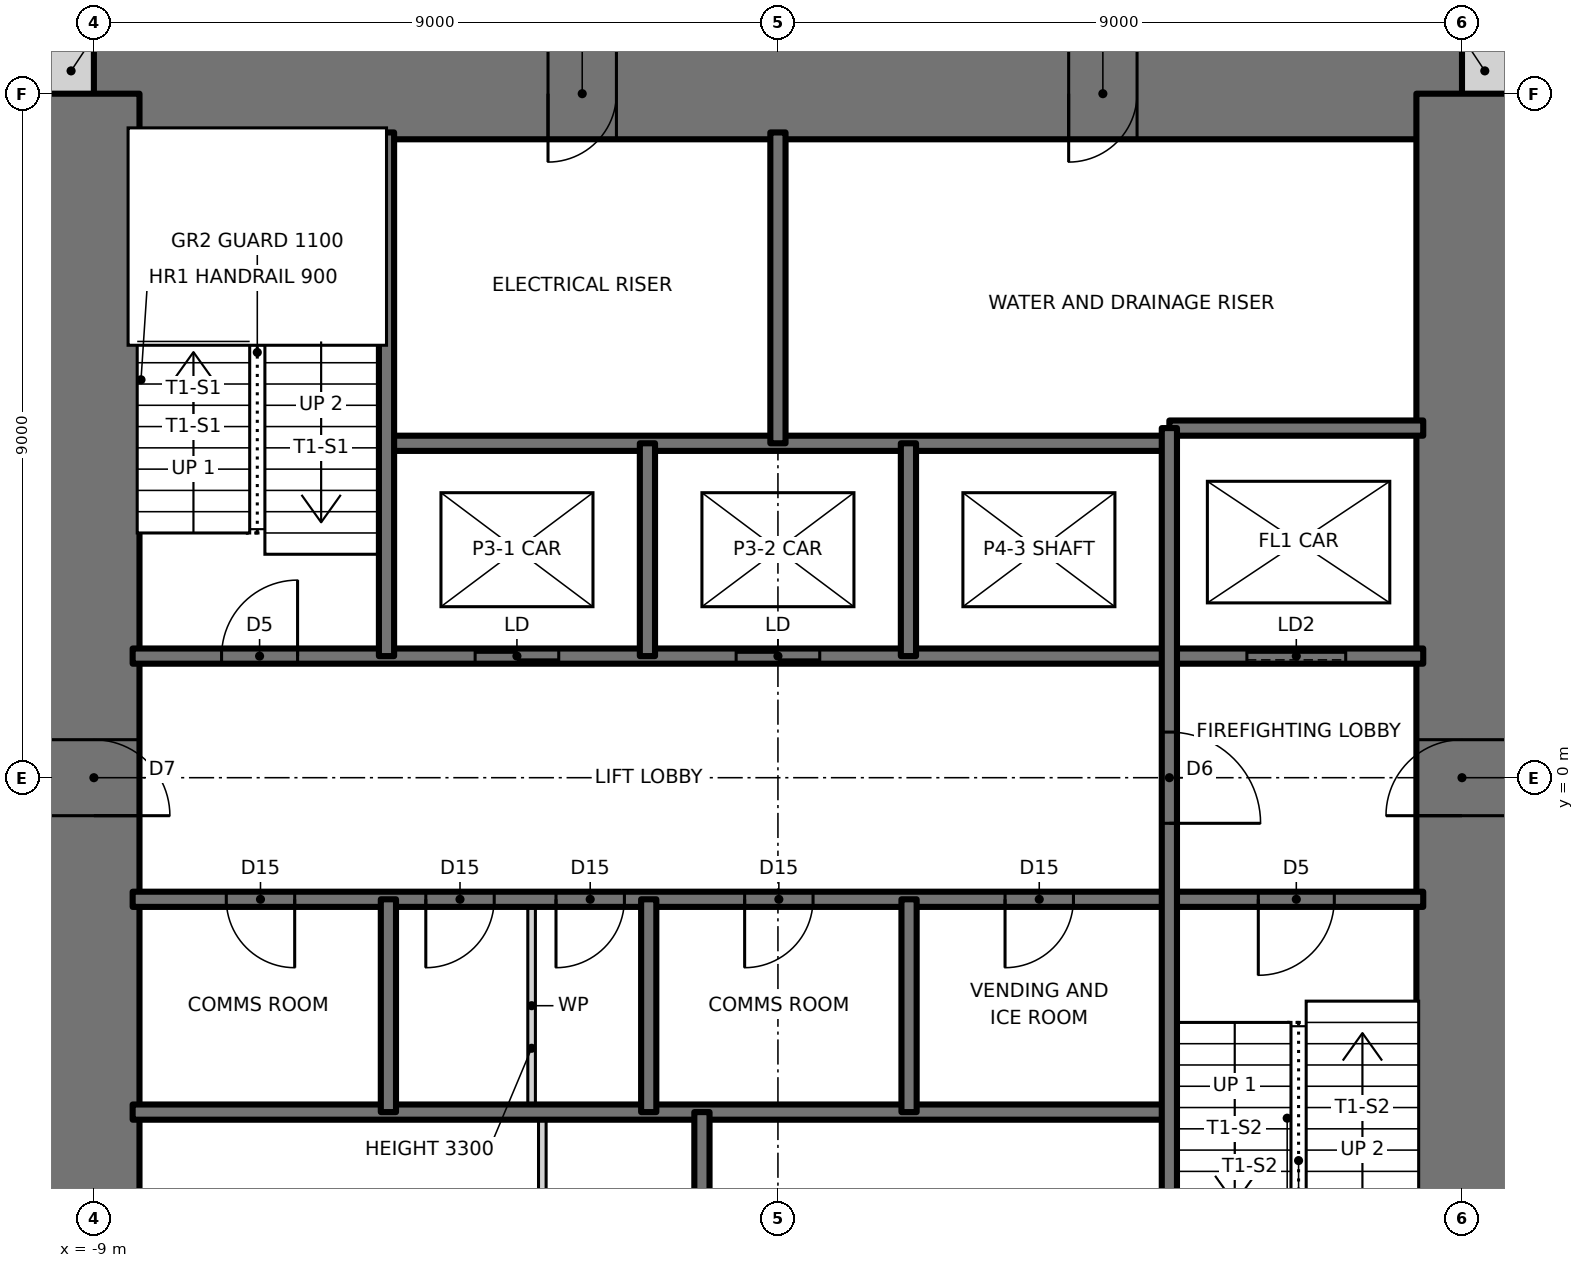
"""IFC4 building model, lengths in metres.
Left out: names, types, materials, properties, quantities, classifications, styles, units other than length and angle.
Written with IfcOpenShell. Run it as: python <this file> out.ifc"""

import sys

from ifc_helpers import new_model, si_unit, direction, frame, frame_2d, origin, place, context, subcontext, project, spatial, rectangle, extrude, element, fill, save


model = new_model("IFC4")
c1 = context("Model", 3, precision=1e-05, world=origin(), true_north=direction((0.0, 1.0)))
c2 = subcontext(c1, "Body", "Model", "MODEL_VIEW")
j1 = project(units=[si_unit("LENGTHUNIT", "METRE"), si_unit("PLANEANGLEUNIT", "RADIAN")], contexts=[c1])
p1 = place(None, origin())
s1 = spatial("IfcSite", under=j1, at=p1, CompositionType="ELEMENT")
p2 = place(p1, origin())
s2 = spatial("IfcBuilding", under=s1, at=p2, CompositionType="ELEMENT")
p3 = place(p2, frame((0.0, 0.0, 163.5)))
s3 = spatial("IfcBuildingStorey", under=s2, at=p3, CompositionType="ELEMENT", Elevation=163.5)
for number, where, z_axis, x_axis in (
    (1, (9.0, 9.3, 0.0), (0.0, 0.0, 1.0), (1.0, 0.0, 0.0)),
    (2, (-9.6, 9.3, 0.0), (0.0, 0.0, 1.0), (1.0, 0.0, 0.0)),
):
    element("IfcWall", number, at=place(p3, frame(where, z_axis=z_axis, x_axis=x_axis)), inside=s3, PredefinedType="SOLIDWALL", context=c2, shape_type="SweptSolid", body=[
        extrude(rectangle(XDim=0.6, YDim=0.6, at=frame_2d((0.3, 0.0))), origin(), (0.0, 0.0, 1.0), 3.5),
    ])
p4 = place(p3, frame((9.0, 9.0, 0.0), z_axis=(0.0, 0.0, 1.0), x_axis=(-1.0, 0.0, 0.0)))
e3 = element("IfcWall", 3, at=p4, inside=s3, PredefinedType="SHEAR", context=c2, shape_type="SweptSolid", body=[
    extrude(rectangle(XDim=18.0, YDim=1.2, at=frame_2d((9.0, 0.0))), origin(), (0.0, 0.0, 1.0), 3.5),
])
p5 = place(p4, frame((11.125, 0.0, 0.0)))
e4 = element("IfcOpeningElement", 4, at=p5, cuts=e3, PredefinedType="OPENING", context=c2, shape_type="SweptSolid", body=[
    extrude(rectangle(XDim=0.9, YDim=2.1, at=frame_2d((0.45, 1.05))), frame((0.0, 0.61, 0.0), z_axis=(0.0, -1.0, 0.0), x_axis=(1.0, 0.0, 0.0)), (0.0, 0.0, 1.0), 1.22),
])
p6 = place(p4, frame((4.275, 0.0, 0.0)))
e5 = element("IfcOpeningElement", 5, at=p6, cuts=e3, PredefinedType="OPENING", context=c2, shape_type="SweptSolid", body=[
    extrude(rectangle(XDim=0.9, YDim=2.1, at=frame_2d((0.45, 1.05))), frame((0.0, 0.61, 0.0), z_axis=(0.0, -1.0, 0.0), x_axis=(1.0, 0.0, 0.0)), (0.0, 0.0, 1.0), 1.22),
])
p7 = place(p3, frame((9.0, -9.0, 0.0), z_axis=(0.0, 0.0, 1.0), x_axis=(0.0, 1.0, 0.0)))
e6 = element("IfcWall", 6, at=p7, inside=s3, PredefinedType="SHEAR", context=c2, shape_type="SweptSolid", body=[
    extrude(rectangle(XDim=18.0, YDim=1.2, at=frame_2d((9.0, 0.0))), origin(), (0.0, 0.0, 1.0), 3.5),
])
p8 = place(p7, frame((8.5, 0.0, 0.0)))
e7 = element("IfcOpeningElement", 7, at=p8, cuts=e6, PredefinedType="OPENING", context=c2, shape_type="SweptSolid", body=[
    extrude(rectangle(XDim=1.0, YDim=2.1, at=frame_2d((0.5, 1.05))), frame((0.0, 0.61, 0.0), z_axis=(0.0, -1.0, 0.0), x_axis=(1.0, 0.0, 0.0)), (0.0, 0.0, 1.0), 1.22),
])
p9 = place(p3, frame((-9.0, 9.0, 0.0), z_axis=(0.0, 0.0, 1.0), x_axis=(0.0, -1.0, 0.0)))
e8 = element("IfcWall", 8, at=p9, inside=s3, PredefinedType="SHEAR", context=c2, shape_type="SweptSolid", body=[
    extrude(rectangle(XDim=18.0, YDim=1.2, at=frame_2d((9.0, 0.0))), origin(), (0.0, 0.0, 1.0), 3.5),
])
p10 = place(p9, frame((8.5, 0.0, 0.0)))
e9 = element("IfcOpeningElement", 9, at=p10, cuts=e8, PredefinedType="OPENING", context=c2, shape_type="SweptSolid", body=[
    extrude(rectangle(XDim=1.0, YDim=2.1, at=frame_2d((0.5, 1.05))), frame((0.0, 0.61, 0.0), z_axis=(0.0, -1.0, 0.0), x_axis=(1.0, 0.0, 0.0)), (0.0, 0.0, 1.0), 1.22),
])
p11 = place(p3, frame((-8.49, -4.4, 0.0), z_axis=(0.0, 0.0, 1.0), x_axis=(1.0, 0.0, 0.0)))
e10 = element("IfcWall", 10, at=p11, inside=s3, PredefinedType="SOLIDWALL", context=c2, shape_type="SweptSolid", body=[
    extrude(rectangle(XDim=13.64, YDim=0.2, at=frame_2d((6.82, 0.0))), origin(), (0.0, 0.0, 1.0), 3.5),
])
p12 = place(p3, frame((-8.49, -1.6, 0.0), z_axis=(0.0, 0.0, 1.0), x_axis=(1.0, 0.0, 0.0)))
e11 = element("IfcWall", 11, at=p12, inside=s3, PredefinedType="SOLIDWALL", context=c2, shape_type="SweptSolid", body=[
    extrude(rectangle(XDim=16.98, YDim=0.2, at=frame_2d((8.49, 0.0))), origin(), (0.0, 0.0, 1.0), 3.5),
])
p13 = place(p12, frame((14.81, 0.0, 0.0)))
e12 = element("IfcOpeningElement", 12, at=p13, cuts=e11, PredefinedType="OPENING", context=c2, shape_type="SweptSolid", body=[
    extrude(rectangle(XDim=1.0, YDim=2.1, at=frame_2d((0.5, 1.05))), frame((0.0, 0.11, 0.0), z_axis=(0.0, -1.0, 0.0), x_axis=(1.0, 0.0, 0.0)), (0.0, 0.0, 1.0), 0.22),
])
p14 = place(p12, frame((1.232, 0.0, 0.0)))
e13 = element("IfcOpeningElement", 13, at=p14, cuts=e11, PredefinedType="OPENING", context=c2, shape_type="SweptSolid", body=[
    extrude(rectangle(XDim=0.9, YDim=2.1, at=frame_2d((0.45, 1.05))), frame((0.0, 0.11, 0.0), z_axis=(0.0, -1.0, 0.0), x_axis=(1.0, 0.0, 0.0)), (0.0, 0.0, 1.0), 0.22),
])
p15 = place(p12, frame((5.57, 0.0, 0.0)))
e14 = element("IfcOpeningElement", 14, at=p15, cuts=e11, PredefinedType="OPENING", context=c2, shape_type="SweptSolid", body=[
    extrude(rectangle(XDim=0.9, YDim=2.1, at=frame_2d((0.45, 1.05))), frame((0.0, 0.11, 0.0), z_axis=(0.0, -1.0, 0.0), x_axis=(1.0, 0.0, 0.0)), (0.0, 0.0, 1.0), 0.22),
])
p16 = place(p12, frame((3.857, 0.0, 0.0)))
e15 = element("IfcOpeningElement", 15, at=p16, cuts=e11, PredefinedType="OPENING", context=c2, shape_type="SweptSolid", body=[
    extrude(rectangle(XDim=0.9, YDim=2.1, at=frame_2d((0.45, 1.05))), frame((0.0, 0.11, 0.0), z_axis=(0.0, -1.0, 0.0), x_axis=(1.0, 0.0, 0.0)), (0.0, 0.0, 1.0), 0.22),
])
p17 = place(p12, frame((8.052, 0.0, 0.0)))
e16 = element("IfcOpeningElement", 16, at=p17, cuts=e11, PredefinedType="OPENING", context=c2, shape_type="SweptSolid", body=[
    extrude(rectangle(XDim=0.9, YDim=2.1, at=frame_2d((0.45, 1.05))), frame((0.0, 0.11, 0.0), z_axis=(0.0, -1.0, 0.0), x_axis=(1.0, 0.0, 0.0)), (0.0, 0.0, 1.0), 0.22),
])
p18 = place(p12, frame((11.478, 0.0, 0.0)))
e17 = element("IfcOpeningElement", 17, at=p18, cuts=e11, PredefinedType="OPENING", context=c2, shape_type="SweptSolid", body=[
    extrude(rectangle(XDim=0.9, YDim=2.1, at=frame_2d((0.45, 1.05))), frame((0.0, 0.11, 0.0), z_axis=(0.0, -1.0, 0.0), x_axis=(1.0, 0.0, 0.0)), (0.0, 0.0, 1.0), 0.22),
])
p19 = place(p3, frame((-8.49, 1.6, 0.0), z_axis=(0.0, 0.0, 1.0), x_axis=(1.0, 0.0, 0.0)))
e18 = element("IfcWall", 18, at=p19, inside=s3, PredefinedType="SOLIDWALL", context=c2, shape_type="SweptSolid", body=[
    extrude(rectangle(XDim=16.98, YDim=0.2, at=frame_2d((8.49, 0.0))), origin(), (0.0, 0.0, 1.0), 3.5),
])
p20 = place(p19, frame((1.17, 0.0, 0.0)))
e19 = element("IfcOpeningElement", 19, at=p20, cuts=e18, PredefinedType="OPENING", context=c2, shape_type="SweptSolid", body=[
    extrude(rectangle(XDim=1.0, YDim=2.1, at=frame_2d((0.5, 1.05))), frame((0.0, 0.11, 0.0), z_axis=(0.0, -1.0, 0.0), x_axis=(1.0, 0.0, 0.0)), (0.0, 0.0, 1.0), 0.22),
])
p21 = place(p19, frame((4.506, 0.0, 0.0)))
e20 = element("IfcOpeningElement", 20, at=p21, cuts=e18, PredefinedType="OPENING", context=c2, shape_type="SweptSolid", body=[
    extrude(rectangle(XDim=1.1, YDim=2.1, at=frame_2d((0.55, 1.05))), frame((0.0, 0.11, 0.0), z_axis=(0.0, -1.0, 0.0), x_axis=(1.0, 0.0, 0.0)), (0.0, 0.0, 1.0), 0.22),
])
p22 = place(p19, frame((7.94, 0.0, 0.0)))
e21 = element("IfcOpeningElement", 21, at=p22, cuts=e18, PredefinedType="OPENING", context=c2, shape_type="SweptSolid", body=[
    extrude(rectangle(XDim=1.1, YDim=2.1, at=frame_2d((0.55, 1.05))), frame((0.0, 0.11, 0.0), z_axis=(0.0, -1.0, 0.0), x_axis=(1.0, 0.0, 0.0)), (0.0, 0.0, 1.0), 0.22),
])
p23 = place(p19, frame((14.66, 0.0, 0.0)))
e22 = element("IfcOpeningElement", 22, at=p23, cuts=e18, PredefinedType="OPENING", context=c2, shape_type="SweptSolid", body=[
    extrude(rectangle(XDim=1.3, YDim=2.1, at=frame_2d((0.65, 1.05))), frame((0.0, 0.11, 0.0), z_axis=(0.0, -1.0, 0.0), x_axis=(1.0, 0.0, 0.0)), (0.0, 0.0, 1.0), 0.22),
])
p24 = place(p3, frame((-5.15, 4.4, 0.0), z_axis=(0.0, 0.0, 1.0), x_axis=(1.0, 0.0, 0.0)))
e23 = element("IfcWall", 23, at=p24, inside=s3, PredefinedType="SOLIDWALL", context=c2, shape_type="SweptSolid", body=[
    extrude(rectangle(XDim=10.3, YDim=0.2, at=frame_2d((5.15, 0.0))), origin(), (0.0, 0.0, 1.0), 3.5),
])
p25 = place(p3, frame((5.15, 4.6, 0.0), z_axis=(0.0, 0.0, 1.0), x_axis=(1.0, 0.0, 0.0)))
e24 = element("IfcWall", 24, at=p25, inside=s3, PredefinedType="SOLIDWALL", context=c2, shape_type="SweptSolid", body=[
    extrude(rectangle(XDim=3.34, YDim=0.2, at=frame_2d((1.67, 0.0))), origin(), (0.0, 0.0, 1.0), 3.5),
])
p26 = place(p3, frame((5.15, -8.49, 0.0), z_axis=(0.0, 0.0, 1.0), x_axis=(0.0, 1.0, 0.0)))
e25 = element("IfcWall", 25, at=p26, inside=s3, PredefinedType="SOLIDWALL", context=c2, shape_type="SweptSolid", body=[
    extrude(rectangle(XDim=13.09, YDim=0.2, at=frame_2d((6.545, 0.0))), origin(), (0.0, 0.0, 1.0), 3.5),
])
p27 = place(p26, frame((7.89, 0.0, 0.0)))
e26 = element("IfcOpeningElement", 26, at=p27, cuts=e25, PredefinedType="OPENING", context=c2, shape_type="SweptSolid", body=[
    extrude(rectangle(XDim=1.2, YDim=2.1, at=frame_2d((0.6, 1.05))), frame((0.0, 0.11, 0.0), z_axis=(0.0, -1.0, 0.0), x_axis=(1.0, 0.0, 0.0)), (0.0, 0.0, 1.0), 0.22),
])
for number, where, z_axis, x_axis in (
    (27, (1.725, -4.4, 0.0), (0.0, 0.0, 1.0), (0.0, 1.0, 0.0)),
    (28, (1.717, 1.6, 0.0), (0.0, 0.0, 1.0), (0.0, 1.0, 0.0)),
):
    element("IfcWall", number, at=place(p3, frame(where, z_axis=z_axis, x_axis=x_axis)), inside=s3, PredefinedType="SOLIDWALL", context=c2, shape_type="SweptSolid", body=[
        extrude(rectangle(XDim=2.8, YDim=0.2, at=frame_2d((1.4, 0.0))), origin(), (0.0, 0.0, 1.0), 3.5),
    ])
for number, where, z_axis, x_axis in (
    (29, (0.0, 4.4, 0.0), (0.0, 0.0, 1.0), (0.0, 1.0, 0.0)),
    (30, (-1.0, -8.49, 0.0), (0.0, 0.0, 1.0), (0.0, 1.0, 0.0)),
):
    element("IfcWall", number, at=place(p3, frame(where, z_axis=z_axis, x_axis=x_axis)), inside=s3, PredefinedType="SOLIDWALL", context=c2, shape_type="SweptSolid", body=[
        extrude(rectangle(XDim=4.09, YDim=0.2, at=frame_2d((2.045, 0.0))), origin(), (0.0, 0.0, 1.0), 3.5),
    ])
for number, where, z_axis, x_axis in (
    (31, (-1.7, -4.4, 0.0), (0.0, 0.0, 1.0), (0.0, 1.0, 0.0)),
    (32, (-1.717, 1.6, 0.0), (0.0, 0.0, 1.0), (0.0, 1.0, 0.0)),
):
    element("IfcWall", number, at=place(p3, frame(where, z_axis=z_axis, x_axis=x_axis)), inside=s3, PredefinedType="SOLIDWALL", context=c2, shape_type="SweptSolid", body=[
        extrude(rectangle(XDim=2.8, YDim=0.2, at=frame_2d((1.4, 0.0))), origin(), (0.0, 0.0, 1.0), 3.5),
    ])
p28 = place(p3, frame((-3.1, -8.49, 0.0), z_axis=(0.0, 0.0, 1.0), x_axis=(0.0, 1.0, 0.0)))
e33 = element("IfcWall", 33, at=p28, inside=s3, PredefinedType="PARTITIONING", context=c2, shape_type="SweptSolid", body=[
    extrude(rectangle(XDim=4.09, YDim=0.1, at=frame_2d((2.045, 0.0))), origin(), (0.0, 0.0, 1.0), 3.3),
])
p29 = place(p28, frame((1.595, 0.0, 0.0)))
e34 = element("IfcOpeningElement", 34, at=p29, cuts=e33, PredefinedType="OPENING", context=c2, shape_type="SweptSolid", body=[
    extrude(rectangle(XDim=0.9, YDim=2.1, at=frame_2d((0.45, 1.05))), frame((0.0, 0.06, 0.0), z_axis=(0.0, -1.0, 0.0), x_axis=(1.0, 0.0, 0.0)), (0.0, 0.0, 1.0), 0.12),
])
p30 = place(p3, frame((-3.241, -4.4, 0.0), z_axis=(0.0, 0.0, 1.0), x_axis=(0.0, 1.0, 0.0)))
e35 = element("IfcWall", 35, at=p30, inside=s3, PredefinedType="PARTITIONING", context=c2, shape_type="SweptSolid", body=[
    extrude(rectangle(XDim=2.8, YDim=0.1, at=frame_2d((1.4, 0.0))), origin(), (0.0, 0.0, 1.0), 3.3),
])
p31 = place(p3, frame((-5.125, -4.4, 0.0), z_axis=(0.0, 0.0, 1.0), x_axis=(0.0, 1.0, 0.0)))
e36 = element("IfcWall", 36, at=p31, inside=s3, PredefinedType="SOLIDWALL", context=c2, shape_type="SweptSolid", body=[
    extrude(rectangle(XDim=2.8, YDim=0.2, at=frame_2d((1.4, 0.0))), origin(), (0.0, 0.0, 1.0), 3.5),
])
p32 = place(p3, frame((-5.15, 1.6, 0.0), z_axis=(0.0, 0.0, 1.0), x_axis=(0.0, 1.0, 0.0)))
e37 = element("IfcWall", 37, at=p32, inside=s3, PredefinedType="SOLIDWALL", context=c2, shape_type="SweptSolid", body=[
    extrude(rectangle(XDim=6.89, YDim=0.2, at=frame_2d((3.445, 0.0))), origin(), (0.0, 0.0, 1.0), 3.5),
])
p33 = place(p20, origin())
e38 = element("IfcDoor", 38, at=p33, inside=s3, OperationType="SINGLE_SWING_RIGHT", PredefinedType="DOOR", context=c2, shape_type="SweptSolid", body=[
    extrude(rectangle(XDim=1.0, YDim=2.1, at=frame_2d((0.5, 1.05))), frame((0.0, 0.025, 0.0), z_axis=(0.0, -1.0, 0.0), x_axis=(1.0, 0.0, 0.0)), (0.0, 0.0, 1.0), 0.05),
])
fill(e19, e38)
p34 = place(p13, frame((1.0, 0.0, 0.0), z_axis=(0.0, 0.0, 1.0), x_axis=(-1.0, 0.0, 0.0)))
e39 = element("IfcDoor", 39, at=p34, inside=s3, OperationType="SINGLE_SWING_RIGHT", PredefinedType="DOOR", context=c2, shape_type="SweptSolid", body=[
    extrude(rectangle(XDim=1.0, YDim=2.1, at=frame_2d((0.5, 1.05))), frame((0.0, 0.025, 0.0), z_axis=(0.0, -1.0, 0.0), x_axis=(1.0, 0.0, 0.0)), (0.0, 0.0, 1.0), 0.05),
])
fill(e12, e39)
p35 = place(p27, frame((1.2, 0.0, 0.0), z_axis=(0.0, 0.0, 1.0), x_axis=(-1.0, 0.0, 0.0)))
e40 = element("IfcDoor", 40, at=p35, inside=s3, OperationType="SINGLE_SWING_RIGHT", PredefinedType="DOOR", context=c2, shape_type="SweptSolid", body=[
    extrude(rectangle(XDim=1.2, YDim=2.1, at=frame_2d((0.6, 1.05))), frame((0.0, 0.025, 0.0), z_axis=(0.0, -1.0, 0.0), x_axis=(1.0, 0.0, 0.0)), (0.0, 0.0, 1.0), 0.05),
])
fill(e26, e40)
p36 = place(p14, frame((0.9, 0.0, 0.0), z_axis=(0.0, 0.0, 1.0), x_axis=(-1.0, 0.0, 0.0)))
e41 = element("IfcDoor", 41, at=p36, inside=s3, OperationType="SINGLE_SWING_LEFT", PredefinedType="DOOR", context=c2, shape_type="SweptSolid", body=[
    extrude(rectangle(XDim=0.9, YDim=2.1, at=frame_2d((0.45, 1.05))), frame((0.0, 0.025, 0.0), z_axis=(0.0, -1.0, 0.0), x_axis=(1.0, 0.0, 0.0)), (0.0, 0.0, 1.0), 0.05),
])
fill(e13, e41)
p37 = place(p15, frame((0.9, 0.0, 0.0), z_axis=(0.0, 0.0, 1.0), x_axis=(-1.0, 0.0, 0.0)))
e42 = element("IfcDoor", 42, at=p37, inside=s3, OperationType="SINGLE_SWING_RIGHT", PredefinedType="DOOR", context=c2, shape_type="SweptSolid", body=[
    extrude(rectangle(XDim=0.9, YDim=2.1, at=frame_2d((0.45, 1.05))), frame((0.0, 0.025, 0.0), z_axis=(0.0, -1.0, 0.0), x_axis=(1.0, 0.0, 0.0)), (0.0, 0.0, 1.0), 0.05),
])
fill(e14, e42)
p38 = place(p16, frame((0.9, 0.0, 0.0), z_axis=(0.0, 0.0, 1.0), x_axis=(-1.0, 0.0, 0.0)))
e43 = element("IfcDoor", 43, at=p38, inside=s3, OperationType="SINGLE_SWING_RIGHT", PredefinedType="DOOR", context=c2, shape_type="SweptSolid", body=[
    extrude(rectangle(XDim=0.9, YDim=2.1, at=frame_2d((0.45, 1.05))), frame((0.0, 0.025, 0.0), z_axis=(0.0, -1.0, 0.0), x_axis=(1.0, 0.0, 0.0)), (0.0, 0.0, 1.0), 0.05),
])
fill(e15, e43)
p39 = place(p17, frame((0.9, 0.0, 0.0), z_axis=(0.0, 0.0, 1.0), x_axis=(-1.0, 0.0, 0.0)))
e44 = element("IfcDoor", 44, at=p39, inside=s3, OperationType="SINGLE_SWING_RIGHT", PredefinedType="DOOR", context=c2, shape_type="SweptSolid", body=[
    extrude(rectangle(XDim=0.9, YDim=2.1, at=frame_2d((0.45, 1.05))), frame((0.0, 0.025, 0.0), z_axis=(0.0, -1.0, 0.0), x_axis=(1.0, 0.0, 0.0)), (0.0, 0.0, 1.0), 0.05),
])
fill(e16, e44)
p40 = place(p18, frame((0.9, 0.0, 0.0), z_axis=(0.0, 0.0, 1.0), x_axis=(-1.0, 0.0, 0.0)))
e45 = element("IfcDoor", 45, at=p40, inside=s3, OperationType="SINGLE_SWING_RIGHT", PredefinedType="DOOR", context=c2, shape_type="SweptSolid", body=[
    extrude(rectangle(XDim=0.9, YDim=2.1, at=frame_2d((0.45, 1.05))), frame((0.0, 0.025, 0.0), z_axis=(0.0, -1.0, 0.0), x_axis=(1.0, 0.0, 0.0)), (0.0, 0.0, 1.0), 0.05),
])
fill(e17, e45)
p41 = place(p10, origin())
e46 = element("IfcDoor", 46, at=p41, inside=s3, OperationType="SINGLE_SWING_RIGHT", PredefinedType="DOOR", context=c2, shape_type="SweptSolid", body=[
    extrude(rectangle(XDim=1.0, YDim=2.1, at=frame_2d((0.5, 1.05))), frame((0.0, 0.025, 0.0), z_axis=(0.0, -1.0, 0.0), x_axis=(1.0, 0.0, 0.0)), (0.0, 0.0, 1.0), 0.05),
])
fill(e9, e46)
p42 = place(p8, origin())
e47 = element("IfcDoor", 47, at=p42, inside=s3, OperationType="SINGLE_SWING_LEFT", PredefinedType="DOOR", context=c2, shape_type="SweptSolid", body=[
    extrude(rectangle(XDim=1.0, YDim=2.1, at=frame_2d((0.5, 1.05))), frame((0.0, 0.025, 0.0), z_axis=(0.0, -1.0, 0.0), x_axis=(1.0, 0.0, 0.0)), (0.0, 0.0, 1.0), 0.05),
])
fill(e7, e47)
p43 = place(p5, origin())
e48 = element("IfcDoor", 48, at=p43, inside=s3, OperationType="SINGLE_SWING_RIGHT", PredefinedType="DOOR", context=c2, shape_type="SweptSolid", body=[
    extrude(rectangle(XDim=0.9, YDim=2.1, at=frame_2d((0.45, 1.05))), frame((0.0, 0.025, 0.0), z_axis=(0.0, -1.0, 0.0), x_axis=(1.0, 0.0, 0.0)), (0.0, 0.0, 1.0), 0.05),
])
fill(e4, e48)
p44 = place(p6, origin())
e49 = element("IfcDoor", 49, at=p44, inside=s3, OperationType="SINGLE_SWING_RIGHT", PredefinedType="DOOR", context=c2, shape_type="SweptSolid", body=[
    extrude(rectangle(XDim=0.9, YDim=2.1, at=frame_2d((0.45, 1.05))), frame((0.0, 0.025, 0.0), z_axis=(0.0, -1.0, 0.0), x_axis=(1.0, 0.0, 0.0)), (0.0, 0.0, 1.0), 0.05),
])
fill(e5, e49)
p45 = place(p21, origin())
e50 = element("IfcDoor", 50, at=p45, inside=s3, OperationType="DOUBLE_DOOR_SLIDING", PredefinedType="DOOR", context=c2, shape_type="SweptSolid", body=[
    extrude(rectangle(XDim=1.1, YDim=2.1, at=frame_2d((0.55, 1.05))), frame((0.0, 0.025, 0.0), z_axis=(0.0, -1.0, 0.0), x_axis=(1.0, 0.0, 0.0)), (0.0, 0.0, 1.0), 0.05),
])
fill(e20, e50)
p46 = place(p22, origin())
e51 = element("IfcDoor", 51, at=p46, inside=s3, OperationType="DOUBLE_DOOR_SLIDING", PredefinedType="DOOR", context=c2, shape_type="SweptSolid", body=[
    extrude(rectangle(XDim=1.1, YDim=2.1, at=frame_2d((0.55, 1.05))), frame((0.0, 0.025, 0.0), z_axis=(0.0, -1.0, 0.0), x_axis=(1.0, 0.0, 0.0)), (0.0, 0.0, 1.0), 0.05),
])
fill(e21, e51)
p47 = place(p23, origin())
e52 = element("IfcDoor", 52, at=p47, inside=s3, OperationType="SLIDING_TO_LEFT", PredefinedType="DOOR", context=c2, shape_type="SweptSolid", body=[
    extrude(rectangle(XDim=1.3, YDim=2.1, at=frame_2d((0.65, 1.05))), frame((0.0, 0.025, 0.0), z_axis=(0.0, -1.0, 0.0), x_axis=(1.0, 0.0, 0.0)), (0.0, 0.0, 1.0), 0.05),
])
fill(e22, e52)
save(model, sys.argv[1])
